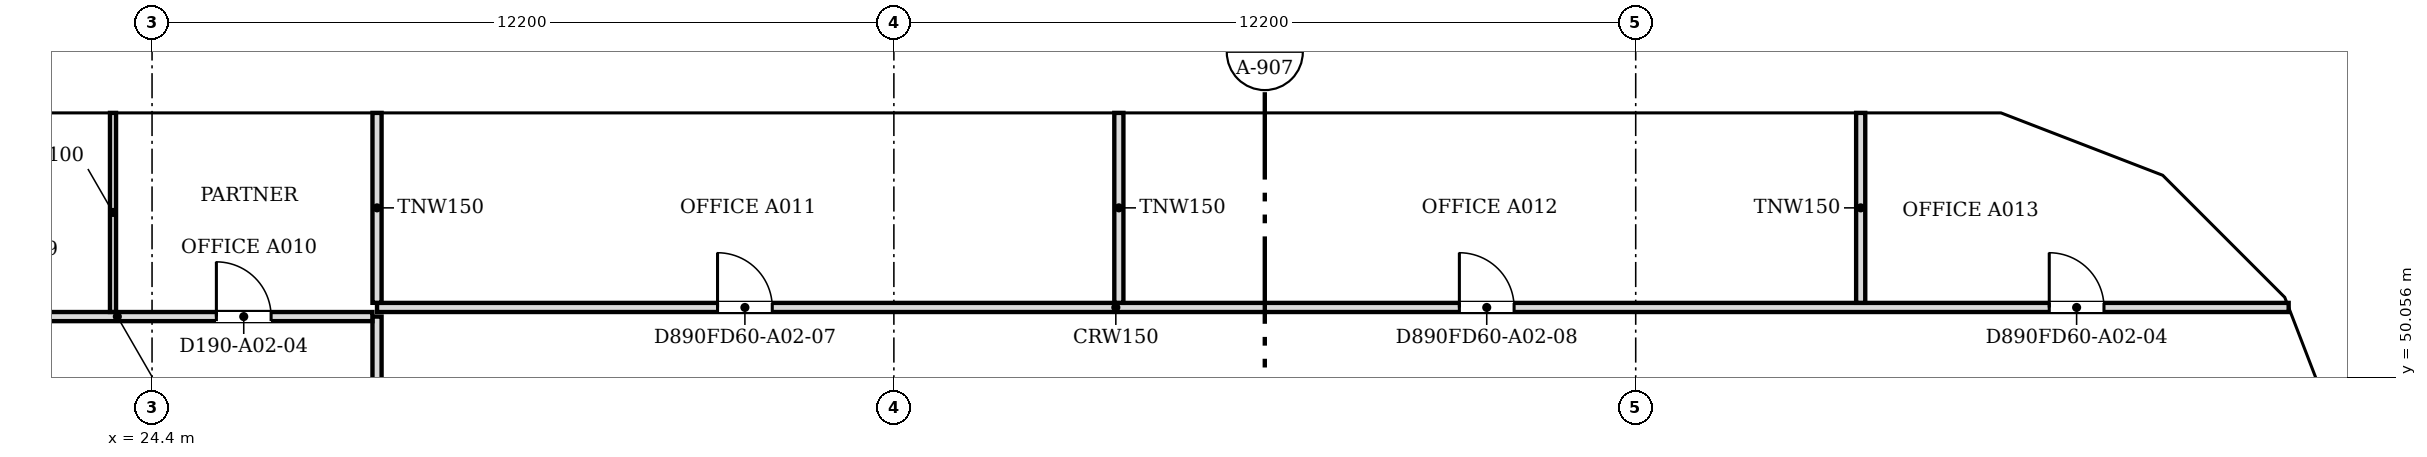
"""IFC4 building model, lengths in metres.
Left out: names, types, materials, properties, quantities, classifications, styles, units other than length and angle.
Written with IfcOpenShell. Run it as: python <this file> out.ifc"""

import sys

from ifc_helpers import new_model, si_unit, direction, frame, frame_2d, origin, place, context, subcontext, project, spatial, polyline, rectangle, outline, extrude, faceted_brep, source, transform, mapped, element, fill, save


model = new_model("IFC4")
c1 = context("Model", 3, precision=1e-05, world=origin(), true_north=direction((0.0, 1.0)))
c2 = subcontext(c1, "Body", "Model", "MODEL_VIEW")
j1 = project(units=[si_unit("LENGTHUNIT", "METRE"), si_unit("PLANEANGLEUNIT", "RADIAN")], contexts=[c1])
p1 = place(None, origin())
s1 = spatial("IfcSite", under=j1, at=p1, CompositionType="ELEMENT")
p2 = place(p1, origin())
s2 = spatial("IfcBuilding", under=s1, at=p2, CompositionType="ELEMENT")
p3 = place(p2, frame((0.0, 0.0, 25.8)))
s3 = spatial("IfcBuildingStorey", under=s2, at=p3, CompositionType="ELEMENT", Elevation=25.8)
m1 = source(origin(), c2, "Body", "Brep", [
    faceted_brep([(3.003, -0.25, 3.732), (2.95, -0.25, 3.8), (0.0, -0.25, 0.0), (3.003, -0.25, 0.0), (0.047, 0.25, 0.06), (2.898, 0.25, 3.732), (2.898, 0.25, 0.0), (0.047, 0.25, 0.0), (2.95, 0.0, 3.8), (0.0, 0.0, 0.0)], [[[0, 1, 2, 3]], [[4, 5, 6, 7]], [[8, 1, 0]], [[5, 4, 9, 2, 1, 8]], [[7, 6, 3, 2, 9]], [[7, 9, 4]], [[3, 6, 5, 8, 0]]]),
])
p4 = place(p3, frame((60.75, 48.753, 0.0), z_axis=(0.0, 0.0, 1.0), x_axis=(-0.35992665181, 0.932980602862, 0.0)))
e1 = element("IfcWall", 1, at=p4, inside=s3, PredefinedType="SOLIDWALL", context=c2, shape_type="MappedRepresentation", body=[
    mapped(m1, transform((0.0, 0.0, 0.0), scale=1.0)),
])
m2 = source(origin(), c2, "Body", "SweptSolid", [
    extrude(outline(polyline([(2.75, 3.135), (0.511, 0.25), (2.75, 0.25), (2.75, 3.135)])), frame((0.0, 0.26, 0.0), z_axis=(0.0, -1.0, 0.0), x_axis=(1.0, 0.0, 0.0)), (0.0, 0.0, 1.0), 0.52),
])
p5 = place(p4, origin())
e2 = element("IfcOpeningElement", 2, at=p5, cuts=e1, PredefinedType="OPENING", context=c2, shape_type="MappedRepresentation", body=[
    mapped(m2, transform((0.0, 0.0, 0.0), scale=1.0)),
])
m3 = source(origin(), c2, "Body", "Brep", [
    faceted_brep([(2.997, -0.25, 0.0), (0.053, -0.25, 3.8), (0.0, -0.25, 3.732), (0.0, -0.25, 0.0), (0.106, 0.25, 3.732), (2.944, 0.25, 0.068), (2.944, 0.25, 0.0), (0.106, 0.25, 0.0), (0.053, 0.0, 3.8), (2.997, 0.0, 0.0)], [[[0, 1, 2, 3]], [[4, 5, 6, 7]], [[5, 4, 8, 1, 0, 9]], [[2, 1, 8]], [[7, 6, 9, 0, 3]], [[7, 3, 2, 8, 4]], [[9, 6, 5]]]),
])
p6 = place(p3, frame((59.726, 51.469, 0.0), z_axis=(0.0, 0.0, 1.0), x_axis=(-0.707106781187, 0.707106781187, 0.0)))
e3 = element("IfcWall", 3, at=p6, inside=s3, PredefinedType="SOLIDWALL", context=c2, shape_type="MappedRepresentation", body=[
    mapped(m3, transform((0.0, 0.0, 0.0), scale=1.0)),
])
m4 = source(origin(), c2, "Body", "SweptSolid", [
    extrude(outline(polyline([(2.487, 0.25), (0.253, 3.134), (0.253, 0.25), (2.487, 0.25)])), frame((0.0, 0.26, 0.0), z_axis=(0.0, -1.0, 0.0), x_axis=(1.0, 0.0, 0.0)), (0.0, 0.0, 1.0), 0.52),
])
p7 = place(p6, origin())
e4 = element("IfcOpeningElement", 4, at=p7, cuts=e3, PredefinedType="OPENING", context=c2, shape_type="MappedRepresentation", body=[
    mapped(m4, transform((0.0, 0.0, 0.0), scale=1.0)),
])
m5 = source(origin(), c2, "Body", "Brep", [
    faceted_brep([(2.997, -0.25, 3.741), (2.95, -0.25, 3.8), (0.0, -0.25, 0.0), (2.997, -0.25, 0.0), (0.053, 0.25, 0.068), (2.904, 0.25, 3.74), (2.904, 0.25, 0.0), (0.053, 0.25, 0.0), (2.95, 0.0, 3.8), (0.0, 0.0, 0.0)], [[[0, 1, 2, 3]], [[4, 5, 6, 7]], [[8, 1, 0]], [[5, 4, 9, 2, 1, 8]], [[7, 6, 3, 2, 9]], [[7, 9, 4]], [[3, 6, 5, 8, 0]]]),
])
p8 = place(p3, frame((57.606, 53.588, 0.0), z_axis=(0.0, 0.0, 1.0), x_axis=(-0.932990326376, 0.359901446078, 0.0)))
e5 = element("IfcWall", 5, at=p8, inside=s3, PredefinedType="SOLIDWALL", context=c2, shape_type="MappedRepresentation", body=[
    mapped(m5, transform((0.0, 0.0, 0.0), scale=1.0)),
])
p9 = place(p8, origin())
e6 = element("IfcOpeningElement", 6, at=p9, cuts=e5, PredefinedType="OPENING", context=c2, shape_type="MappedRepresentation", body=[
    mapped(m2, transform((0.0, 0.0, 0.0), scale=1.0)),
])
m6 = source(origin(), c2, "Body", "Brep", [
    faceted_brep([(3.05, -0.25, 0.0), (0.047, -0.25, 3.8), (0.0, -0.25, 3.74), (0.0, -0.25, 0.0), (0.093, 0.25, 3.741), (3.05, 0.25, 0.0), (0.093, 0.25, 0.0), (0.047, 0.0, 3.8)], [[[0, 1, 2, 3]], [[4, 5, 6]], [[5, 4, 7, 1, 0]], [[2, 1, 7]], [[6, 5, 0, 3]], [[6, 3, 2, 7, 4]]]),
])
p10 = place(p3, frame((54.9, 54.65, 0.0), z_axis=(0.0, 0.0, 1.0), x_axis=(-1.0, 0.0, 0.0)))
e7 = element("IfcWall", 7, at=p10, inside=s3, PredefinedType="SOLIDWALL", context=c2, shape_type="MappedRepresentation", body=[
    mapped(m6, transform((0.0, 0.0, 0.0), scale=1.0)),
])
m7 = source(origin(), c2, "Body", "SweptSolid", [
    extrude(outline(polyline([(2.534, 0.25), (0.247, 3.144), (0.247, 0.25), (2.534, 0.25)])), frame((0.0, 0.26, 0.0), z_axis=(0.0, -1.0, 0.0), x_axis=(1.0, 0.0, 0.0)), (0.0, 0.0, 1.0), 0.52),
])
p11 = place(p10, origin())
e8 = element("IfcOpeningElement", 8, at=p11, cuts=e7, PredefinedType="OPENING", context=c2, shape_type="MappedRepresentation", body=[
    mapped(m7, transform((0.0, 0.0, 0.0), scale=1.0)),
])
m8 = source(origin(), c2, "Body", "SweptSolid", [
    extrude(outline(polyline([(6.1, 0.0), (3.05, 3.8), (0.0, 0.0), (6.1, 0.0)])), frame((0.0, 0.25, 0.0), z_axis=(0.0, -1.0, 0.0), x_axis=(1.0, 0.0, 0.0)), (0.0, 0.0, 1.0), 0.5),
])
p12 = place(p3, frame((51.85, 54.65, 0.0), z_axis=(0.0, 0.0, 1.0), x_axis=(-1.0, 0.0, 0.0)))
e9 = element("IfcWall", 9, at=p12, inside=s3, PredefinedType="SOLIDWALL", context=c2, shape_type="MappedRepresentation", body=[
    mapped(m8, transform((0.0, 0.0, 0.0), scale=1.0)),
])
m9 = source(origin(), c2, "Body", "SweptSolid", [
    extrude(outline(polyline([(5.579, 0.25), (3.05, 3.401), (0.521, 0.25), (5.579, 0.25)])), frame((0.0, 0.26, 0.0), z_axis=(0.0, -1.0, 0.0), x_axis=(1.0, 0.0, 0.0)), (0.0, 0.0, 1.0), 0.52),
])
p13 = place(p12, origin())
e10 = element("IfcOpeningElement", 10, at=p13, cuts=e9, PredefinedType="OPENING", context=c2, shape_type="MappedRepresentation", body=[
    mapped(m9, transform((0.0, 0.0, 0.0), scale=1.0)),
])
p14 = place(p3, frame((45.75, 54.65, 0.0), z_axis=(0.0, 0.0, 1.0), x_axis=(-1.0, 0.0, 0.0)))
e11 = element("IfcWall", 11, at=p14, inside=s3, PredefinedType="SOLIDWALL", context=c2, shape_type="MappedRepresentation", body=[
    mapped(m8, transform((0.0, 0.0, 0.0), scale=1.0)),
])
p15 = place(p14, origin())
e12 = element("IfcOpeningElement", 12, at=p15, cuts=e11, PredefinedType="OPENING", context=c2, shape_type="MappedRepresentation", body=[
    mapped(m9, transform((0.0, 0.0, 0.0), scale=1.0)),
])
m10 = source(origin(), c2, "Body", "Brep", [
    faceted_brep([(6.1, -0.25, 0.0), (3.05, -0.25, 3.8), (0.0, -0.25, 0.0), (6.1, -0.25, 0.0), (0.0, 0.25, 0.0), (3.05, 0.25, 3.8), (6.1, 0.25, 0.0), (6.1, 0.25, 0.0)], [[[0, 1, 2, 3]], [[4, 5, 6, 7]], [[6, 5, 1, 0]], [[5, 4, 2, 1]], [[4, 7, 3, 2]], [[3, 7, 6, 0]]]),
])
p16 = place(p3, frame((39.65, 54.65, 0.0), z_axis=(0.0, 0.0, 1.0), x_axis=(-1.0, 0.0, 0.0)))
e13 = element("IfcWall", 13, at=p16, inside=s3, PredefinedType="SOLIDWALL", context=c2, shape_type="MappedRepresentation", body=[
    mapped(m10, transform((0.0, 0.0, 0.0), scale=1.0)),
])
p17 = place(p16, origin())
e14 = element("IfcOpeningElement", 14, at=p17, cuts=e13, PredefinedType="OPENING", context=c2, shape_type="MappedRepresentation", body=[
    mapped(m9, transform((0.0, 0.0, 0.0), scale=1.0)),
])
p18 = place(p3, frame((33.55, 54.65, 0.0), z_axis=(0.0, 0.0, 1.0), x_axis=(-1.0, 0.0, 0.0)))
e15 = element("IfcWall", 15, at=p18, inside=s3, PredefinedType="SOLIDWALL", context=c2, shape_type="MappedRepresentation", body=[
    mapped(m8, transform((0.0, 0.0, 0.0), scale=1.0)),
])
p19 = place(p18, origin())
e16 = element("IfcOpeningElement", 16, at=p19, cuts=e15, PredefinedType="OPENING", context=c2, shape_type="MappedRepresentation", body=[
    mapped(m9, transform((0.0, 0.0, 0.0), scale=1.0)),
])
p20 = place(p3, frame((27.45, 54.65, 0.0), z_axis=(0.0, 0.0, 1.0), x_axis=(-1.0, 0.0, 0.0)))
e17 = element("IfcWall", 17, at=p20, inside=s3, PredefinedType="SOLIDWALL", context=c2, shape_type="MappedRepresentation", body=[
    mapped(m10, transform((0.0, 0.0, 0.0), scale=1.0)),
])
p21 = place(p20, origin())
e18 = element("IfcOpeningElement", 18, at=p21, cuts=e17, PredefinedType="OPENING", context=c2, shape_type="MappedRepresentation", body=[
    mapped(m9, transform((0.0, 0.0, 0.0), scale=1.0)),
])
p22 = place(p2, frame((0.0, 0.0, 29.6)))
s4 = spatial("IfcBuildingStorey", under=s2, at=p22, CompositionType="ELEMENT", Elevation=29.6)
m11 = source(origin(), c2, "Body", "Brep", [
    faceted_brep([(0.047, -0.25, 0.0), (2.997, -0.25, 3.8), (0.047, -0.25, 7.6), (0.0, -0.25, 7.541), (0.0, -0.25, 0.059), (0.093, 0.25, 7.54), (2.944, 0.25, 3.868), (2.944, 0.25, 3.732), (0.093, 0.25, 0.06), (2.997, 0.0, 3.8), (0.047, 0.0, 0.0), (0.047, 0.0, 7.6)], [[[0, 1, 2, 3, 4]], [[5, 6, 7, 8]], [[8, 7, 9, 1, 0, 10]], [[6, 5, 11, 2, 1, 9]], [[3, 2, 11]], [[10, 0, 4]], [[8, 10, 4, 3, 11, 5]], [[7, 6, 9]]]),
])
p23 = place(p22, frame((60.767, 48.71, -3.8), z_axis=(0.0, 0.0, 1.0), x_axis=(-0.359901446078, 0.932990326376, 0.0)))
e19 = element("IfcWall", 19, at=p23, inside=s4, PredefinedType="SOLIDWALL", context=c2, shape_type="MappedRepresentation", body=[
    mapped(m11, transform((0.0, 0.0, 0.0), scale=1.0)),
])
m12 = source(origin(), c2, "Body", "SweptSolid", [
    extrude(outline(polyline([(0.247, 0.665), (2.681, 3.8), (0.247, 6.935), (0.247, 0.665)])), frame((0.0, 0.26, 0.0), z_axis=(0.0, -1.0, 0.0), x_axis=(1.0, 0.0, 0.0)), (0.0, 0.0, 1.0), 0.52),
])
p24 = place(p23, origin())
e20 = element("IfcOpeningElement", 20, at=p24, cuts=e19, PredefinedType="OPENING", context=c2, shape_type="MappedRepresentation", body=[
    mapped(m12, transform((0.0, 0.0, 0.0), scale=1.0)),
])
m13 = source(origin(), c2, "Body", "Brep", [
    faceted_brep([(2.944, -0.25, 0.0), (2.997, -0.25, 0.068), (2.997, -0.25, 7.532), (2.944, -0.25, 7.6), (0.0, -0.25, 3.8), (0.053, 0.25, 3.868), (2.891, 0.25, 7.532), (2.891, 0.25, 0.068), (0.053, 0.25, 3.732), (2.944, 0.0, 0.0), (2.944, 0.0, 7.6), (0.0, 0.0, 3.8)], [[[0, 1, 2, 3, 4]], [[5, 6, 7, 8]], [[1, 0, 9]], [[10, 3, 2]], [[6, 5, 11, 4, 3, 10]], [[8, 7, 9, 0, 4, 11]], [[8, 11, 5]], [[1, 9, 7, 6, 10, 2]]]),
])
p25 = place(p22, frame((59.688, 51.506, -3.8), z_axis=(0.0, 0.0, 1.0), x_axis=(-0.707106781187, 0.707106781187, 0.0)))
e21 = element("IfcWall", 21, at=p25, inside=s4, PredefinedType="SOLIDWALL", context=c2, shape_type="MappedRepresentation", body=[
    mapped(m13, transform((0.0, 0.0, 0.0), scale=1.0)),
])
m14 = source(origin(), c2, "Body", "SweptSolid", [
    extrude(outline(polyline([(2.744, 6.934), (0.316, 3.8), (2.744, 0.666), (2.744, 6.934)])), frame((0.0, 0.26, 0.0), z_axis=(0.0, -1.0, 0.0), x_axis=(1.0, 0.0, 0.0)), (0.0, 0.0, 1.0), 0.52),
])
p26 = place(p25, origin())
e22 = element("IfcOpeningElement", 22, at=p26, cuts=e21, PredefinedType="OPENING", context=c2, shape_type="MappedRepresentation", body=[
    mapped(m14, transform((0.0, 0.0, 0.0), scale=1.0)),
])
m15 = source(origin(), c2, "Body", "Brep", [
    faceted_brep([(0.053, -0.25, 0.0), (3.003, -0.25, 3.8), (0.053, -0.25, 7.6), (0.0, -0.25, 7.531), (0.0, -0.25, 0.068), (0.106, 0.25, 7.532), (2.957, 0.25, 3.86), (2.957, 0.25, 3.74), (0.106, 0.25, 0.068), (3.003, 0.0, 3.8), (0.053, 0.0, 0.0), (0.053, 0.0, 7.6)], [[[0, 1, 2, 3, 4]], [[5, 6, 7, 8]], [[8, 7, 9, 1, 0, 10]], [[6, 5, 11, 2, 1, 9]], [[3, 2, 11]], [[10, 0, 4]], [[8, 10, 4, 3, 11, 5]], [[7, 6, 9]]]),
])
p27 = place(p22, frame((57.656, 53.569, -3.8), z_axis=(0.0, 0.0, 1.0), x_axis=(-0.933007896601, 0.359855894603, 0.0)))
e23 = element("IfcWall", 23, at=p27, inside=s4, PredefinedType="SOLIDWALL", context=c2, shape_type="MappedRepresentation", body=[
    mapped(m15, transform((0.0, 0.0, 0.0), scale=1.0)),
])
m16 = source(origin(), c2, "Body", "SweptSolid", [
    extrude(outline(polyline([(0.253, 0.665), (2.687, 3.8), (0.253, 6.935), (0.253, 0.665)])), frame((0.0, 0.26, 0.0), z_axis=(0.0, -1.0, 0.0), x_axis=(1.0, 0.0, 0.0)), (0.0, 0.0, 1.0), 0.52),
])
p28 = place(p27, origin())
e24 = element("IfcOpeningElement", 24, at=p28, cuts=e23, PredefinedType="OPENING", context=c2, shape_type="MappedRepresentation", body=[
    mapped(m16, transform((0.0, 0.0, 0.0), scale=1.0)),
])
m17 = source(origin(), c2, "Body", "Brep", [
    faceted_brep([(3.003, -0.25, 0.0), (6.053, -0.25, 3.8), (3.003, -0.25, 7.6), (0.0, -0.25, 3.8), (0.047, 0.25, 3.859), (3.003, 0.25, 7.6), (6.053, 0.25, 3.8), (3.003, 0.25, 0.0), (0.047, 0.25, 3.741), (0.0, 0.0, 3.8)], [[[0, 1, 2, 3]], [[4, 5, 6, 7, 8]], [[7, 6, 1, 0]], [[6, 5, 2, 1]], [[5, 4, 9, 3, 2]], [[8, 7, 0, 3, 9]], [[8, 9, 4]]]),
])
p29 = place(p22, frame((54.854, 54.65, -3.8), z_axis=(0.0, 0.0, 1.0), x_axis=(-1.0, 0.0, 0.0)))
e25 = element("IfcWall", 25, at=p29, inside=s4, PredefinedType="SOLIDWALL", context=c2, shape_type="MappedRepresentation", body=[
    mapped(m17, transform((0.0, 0.0, 0.0), scale=1.0)),
])
m18 = source(origin(), c2, "Body", "SweptSolid", [
    extrude(outline(polyline([(3.005, 0.401), (5.733, 3.8), (3.005, 7.199), (0.319, 3.8), (3.005, 0.401)])), frame((0.0, 0.26, 0.0), z_axis=(0.0, -1.0, 0.0), x_axis=(1.0, 0.0, 0.0)), (0.0, 0.0, 1.0), 0.52),
])
p30 = place(p29, origin())
e26 = element("IfcOpeningElement", 26, at=p30, cuts=e25, PredefinedType="OPENING", context=c2, shape_type="MappedRepresentation", body=[
    mapped(m18, transform((0.0, 0.0, 0.0), scale=1.0)),
])
m19 = source(origin(), c2, "Body", "SweptSolid", [
    extrude(outline(polyline([(3.05, 0.0), (6.1, 3.8), (3.05, 7.6), (0.0, 3.8), (3.05, 0.0)])), frame((0.0, 0.25, 0.0), z_axis=(0.0, -1.0, 0.0), x_axis=(1.0, 0.0, 0.0)), (0.0, 0.0, 1.0), 0.5),
])
p31 = place(p22, frame((48.8, 54.65, -3.8), z_axis=(0.0, 0.0, 1.0), x_axis=(-1.0, 0.0, 0.0)))
e27 = element("IfcWall", 27, at=p31, inside=s4, PredefinedType="SOLIDWALL", context=c2, shape_type="MappedRepresentation", body=[
    mapped(m19, transform((0.0, 0.0, 0.0), scale=1.0)),
])
m20 = source(origin(), c2, "Body", "SweptSolid", [
    extrude(outline(polyline([(3.05, 0.399), (5.78, 3.8), (3.05, 7.2), (0.321, 3.8), (3.05, 0.399)])), frame((0.0, 0.26, 0.0), z_axis=(0.0, -1.0, 0.0), x_axis=(1.0, 0.0, 0.0)), (0.0, 0.0, 1.0), 0.52),
])
p32 = place(p31, origin())
e28 = element("IfcOpeningElement", 28, at=p32, cuts=e27, PredefinedType="OPENING", context=c2, shape_type="MappedRepresentation", body=[
    mapped(m20, transform((0.0, 0.0, 0.0), scale=1.0)),
])
m21 = source(origin(), c2, "Body", "Brep", [
    faceted_brep([(3.05, -0.25, 0.0), (6.1, -0.25, 3.8), (6.1, -0.25, 3.8), (3.05, -0.25, 7.6), (0.0, -0.25, 3.8), (0.0, 0.25, 3.8), (3.05, 0.25, 7.6), (6.1, 0.25, 3.8), (6.1, 0.25, 3.8), (3.05, 0.25, 0.0)], [[[0, 1, 2, 3, 4]], [[5, 6, 7, 8, 9]], [[9, 8, 1, 0]], [[7, 6, 3, 2]], [[6, 5, 4, 3]], [[5, 9, 0, 4]], [[1, 8, 7, 2]]]),
])
p33 = place(p22, frame((42.7, 54.65, -3.8), z_axis=(0.0, 0.0, 1.0), x_axis=(-1.0, 0.0, 0.0)))
e29 = element("IfcWall", 29, at=p33, inside=s4, PredefinedType="SOLIDWALL", context=c2, shape_type="MappedRepresentation", body=[
    mapped(m21, transform((0.0, 0.0, 0.0), scale=1.0)),
])
p34 = place(p33, origin())
e30 = element("IfcOpeningElement", 30, at=p34, cuts=e29, PredefinedType="OPENING", context=c2, shape_type="MappedRepresentation", body=[
    mapped(m20, transform((0.0, 0.0, 0.0), scale=1.0)),
])
p35 = place(p22, frame((36.6, 54.65, -3.8), z_axis=(0.0, 0.0, 1.0), x_axis=(-1.0, 0.0, 0.0)))
e31 = element("IfcWall", 31, at=p35, inside=s4, PredefinedType="SOLIDWALL", context=c2, shape_type="MappedRepresentation", body=[
    mapped(m19, transform((0.0, 0.0, 0.0), scale=1.0)),
])
p36 = place(p35, origin())
e32 = element("IfcOpeningElement", 32, at=p36, cuts=e31, PredefinedType="OPENING", context=c2, shape_type="MappedRepresentation", body=[
    mapped(m20, transform((0.0, 0.0, 0.0), scale=1.0)),
])
p37 = place(p22, frame((30.5, 54.65, -3.8), z_axis=(0.0, 0.0, 1.0), x_axis=(-1.0, 0.0, 0.0)))
e33 = element("IfcWall", 33, at=p37, inside=s4, PredefinedType="SOLIDWALL", context=c2, shape_type="MappedRepresentation", body=[
    mapped(m19, transform((0.0, 0.0, 0.0), scale=1.0)),
])
p38 = place(p37, origin())
e34 = element("IfcOpeningElement", 34, at=p38, cuts=e33, PredefinedType="OPENING", context=c2, shape_type="MappedRepresentation", body=[
    mapped(m20, transform((0.0, 0.0, 0.0), scale=1.0)),
])
p39 = place(p22, frame((24.4, 54.65, -3.8), z_axis=(0.0, 0.0, 1.0), x_axis=(-1.0, 0.0, 0.0)))
e35 = element("IfcWall", 35, at=p39, inside=s4, PredefinedType="SOLIDWALL", context=c2, shape_type="MappedRepresentation", body=[
    mapped(m21, transform((0.0, 0.0, 0.0), scale=1.0)),
])
p40 = place(p39, origin())
e36 = element("IfcOpeningElement", 36, at=p40, cuts=e35, PredefinedType="OPENING", context=c2, shape_type="MappedRepresentation", body=[
    mapped(m20, transform((0.0, 0.0, 0.0), scale=1.0)),
])
p41 = place(p3, frame((28.1, 47.776, 0.0), z_axis=(0.0, 0.0, 1.0), x_axis=(0.0, 1.0, 0.0)))
e37 = element("IfcWall", 37, at=p41, inside=s3, PredefinedType="PARTITIONING", context=c2, shape_type="SweptSolid", body=[
    extrude(rectangle(XDim=3.274, YDim=0.15, at=frame_2d((1.637, 0.0))), origin(), (0.0, 0.0, 1.0), 3.067),
])
p42 = place(p3, frame((19.7, 51.05, 0.0), z_axis=(0.0, 0.0, 1.0), x_axis=(1.0, 0.0, 0.0)))
e38 = element("IfcWall", 38, at=p42, inside=s3, PredefinedType="PARTITIONING", context=c2, shape_type="SweptSolid", body=[
    extrude(rectangle(XDim=8.324, YDim=0.15, at=frame_2d((4.162, 0.0))), origin(), (0.0, 0.0, 1.0), 3.067),
])
m22 = source(origin(), c2, "Body", "SweptSolid", [
    extrude(rectangle(XDim=0.9, YDim=2.1, at=frame_2d((0.45, 1.05))), frame((0.0, 0.085, 0.0), z_axis=(0.0, -1.0, 0.0), x_axis=(1.0, 0.0, 0.0)), (0.0, 0.0, 1.0), 0.17),
])
p43 = place(p42, frame((1.6, 0.0, 0.0)))
e39 = element("IfcOpeningElement", 39, at=p43, cuts=e38, PredefinedType="OPENING", context=c2, shape_type="MappedRepresentation", body=[
    mapped(m22, transform((0.0, 0.0, 0.0), scale=1.0)),
])
p44 = place(p42, frame((5.758, 0.0, 0.0)))
e40 = element("IfcOpeningElement", 40, at=p44, cuts=e38, PredefinedType="OPENING", context=c2, shape_type="MappedRepresentation", body=[
    mapped(m22, transform((0.0, 0.0, 0.0), scale=1.0)),
])
p45 = place(p3, frame((23.758, 51.126, 0.0), z_axis=(0.0, 0.0, 1.0), x_axis=(0.0, 1.0, 0.0)))
e41 = element("IfcWall", 41, at=p45, inside=s3, PredefinedType="PARTITIONING", context=c2, shape_type="SweptSolid", body=[
    extrude(rectangle(XDim=3.274, YDim=0.1, at=frame_2d((1.637, 0.0))), origin(), (0.0, 0.0, 1.0), 3.067),
])
p46 = place(p3, frame((28.1, 51.2, 0.0), z_axis=(0.0, 0.0, 1.0), x_axis=(1.0, 0.0, 0.0)))
e42 = element("IfcWall", 42, at=p46, inside=s3, PredefinedType="PARTITIONING", context=c2, shape_type="SweptSolid", body=[
    extrude(rectangle(XDim=31.438, YDim=0.15, at=frame_2d((15.719, 0.0))), origin(), (0.0, 0.0, 1.0), 3.067),
])
p47 = place(p46, frame((27.501, 0.0, 0.0)))
e43 = element("IfcOpeningElement", 43, at=p47, cuts=e42, PredefinedType="OPENING", context=c2, shape_type="MappedRepresentation", body=[
    mapped(m22, transform((0.0, 0.0, 0.0), scale=1.0)),
])
p48 = place(p46, frame((5.6, 0.0, 0.0)))
e44 = element("IfcOpeningElement", 44, at=p48, cuts=e42, PredefinedType="OPENING", context=c2, shape_type="MappedRepresentation", body=[
    mapped(m22, transform((0.0, 0.0, 0.0), scale=1.0)),
])
p49 = place(p46, frame((17.8, 0.0, 0.0)))
e45 = element("IfcOpeningElement", 45, at=p49, cuts=e42, PredefinedType="OPENING", context=c2, shape_type="MappedRepresentation", body=[
    mapped(m22, transform((0.0, 0.0, 0.0), scale=1.0)),
])
for number, where, z_axis, x_axis in (
    (46, (28.1, 51.276, 0.0), (0.0, 0.0, 1.0), (0.0, 1.0, 0.0)),
    (47, (40.3, 51.276, 0.0), (0.0, 0.0, 1.0), (0.0, 1.0, 0.0)),
    (48, (52.5, 51.276, 0.0), (0.0, 0.0, 1.0), (0.0, 1.0, 0.0)),
):
    element("IfcWall", number, at=place(p3, frame(where, z_axis=z_axis, x_axis=x_axis)), inside=s3, PredefinedType="PARTITIONING", context=c2, shape_type="SweptSolid", body=[
        extrude(rectangle(XDim=3.124, YDim=0.15, at=frame_2d((1.562, 0.0))), origin(), (0.0, 0.0, 1.0), 3.067),
    ])
m23 = source(origin(), c2, "Body", "SweptSolid", [
    extrude(rectangle(XDim=0.9, YDim=2.1, at=frame_2d((0.45, 1.05))), frame((0.0, 0.025, 0.0), z_axis=(0.0, -1.0, 0.0), x_axis=(1.0, 0.0, 0.0)), (0.0, 0.0, 1.0), 0.05),
])
p50 = place(p44, origin())
e49 = element("IfcDoor", 49, at=p50, inside=s3, OperationType="SINGLE_SWING_LEFT", PredefinedType="DOOR", context=c2, shape_type="MappedRepresentation", body=[
    mapped(m23, transform((0.0, 0.0, 0.0), scale=1.0)),
])
fill(e40, e49)
p51 = place(p47, origin())
e50 = element("IfcDoor", 50, at=p51, inside=s3, OperationType="SINGLE_SWING_LEFT", PredefinedType="DOOR", context=c2, shape_type="MappedRepresentation", body=[
    mapped(m23, transform((0.0, 0.0, 0.0), scale=1.0)),
])
fill(e43, e50)
p52 = place(p48, origin())
e51 = element("IfcDoor", 51, at=p52, inside=s3, OperationType="SINGLE_SWING_LEFT", PredefinedType="DOOR", context=c2, shape_type="MappedRepresentation", body=[
    mapped(m23, transform((0.0, 0.0, 0.0), scale=1.0)),
])
fill(e44, e51)
p53 = place(p49, origin())
e52 = element("IfcDoor", 52, at=p53, inside=s3, OperationType="SINGLE_SWING_LEFT", PredefinedType="DOOR", context=c2, shape_type="MappedRepresentation", body=[
    mapped(m23, transform((0.0, 0.0, 0.0), scale=1.0)),
])
fill(e45, e52)
save(model, sys.argv[1])
